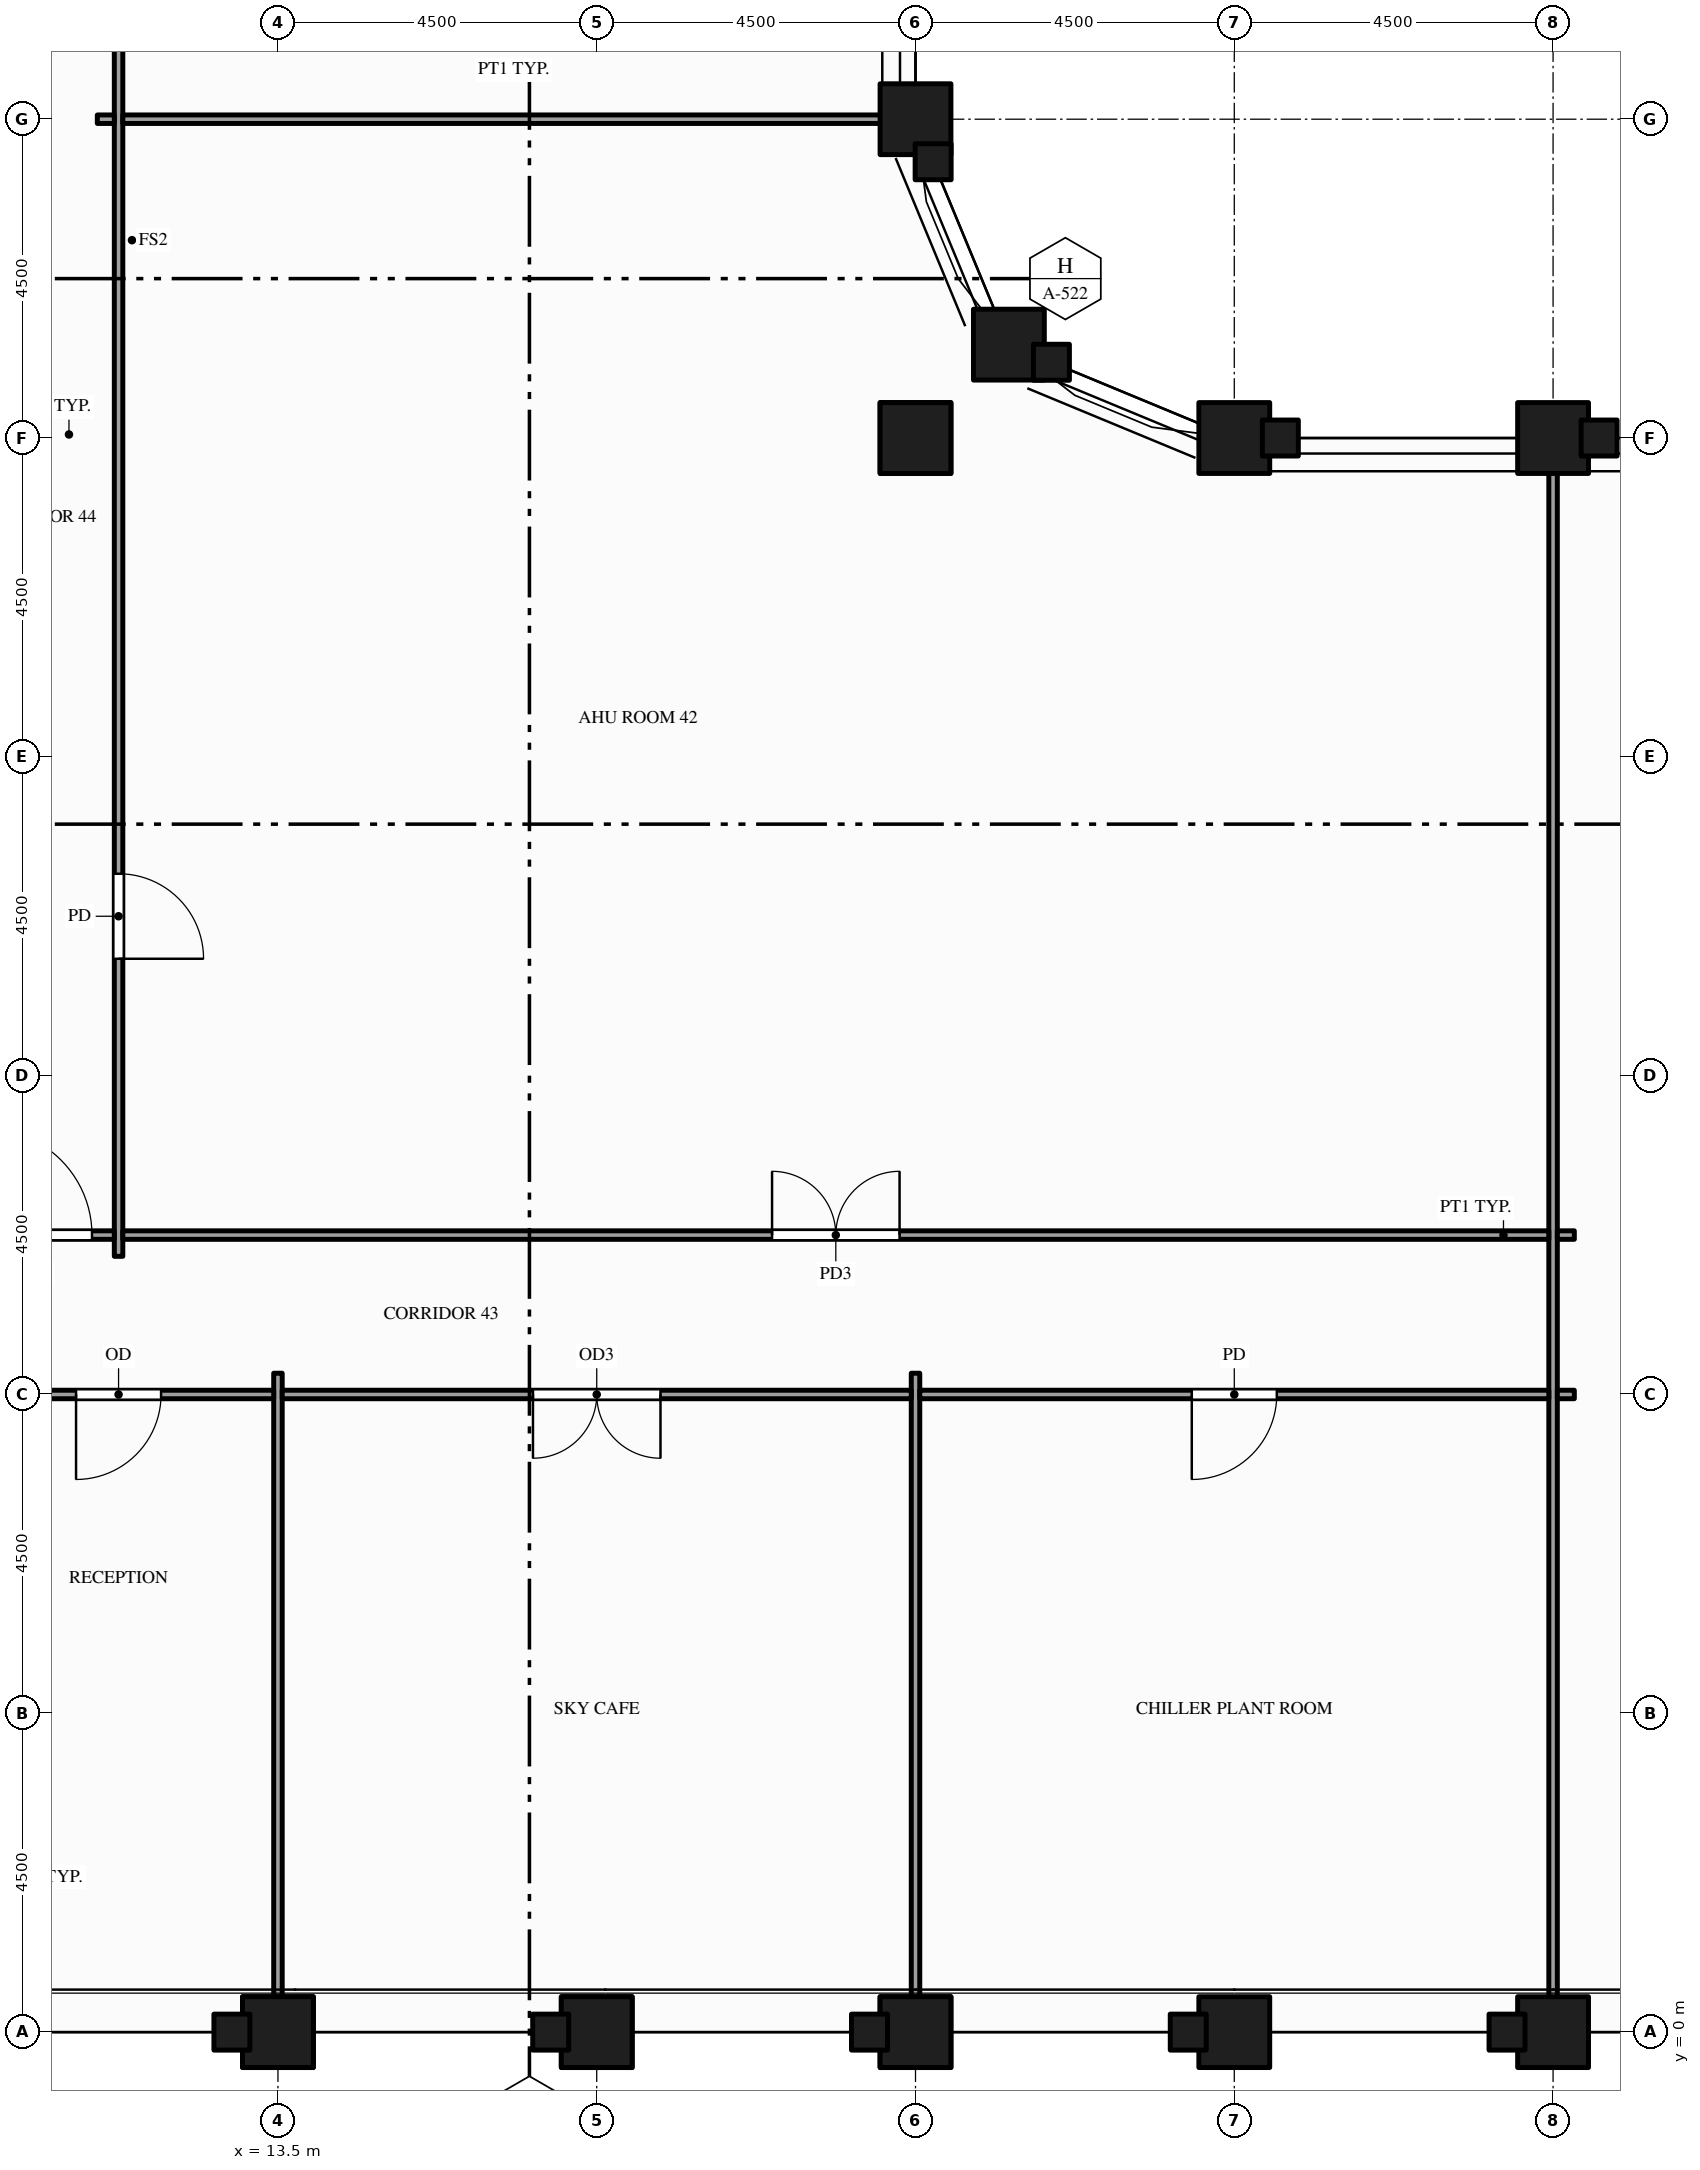
"""IFC4 building model, lengths in metres.
Left out: names, types, materials, properties, quantities, classifications, styles, units other than length and angle.
Written with IfcOpenShell. Run it as: python <this file> out.ifc"""

import sys

from ifc_helpers import new_model, si_unit, direction, frame, frame_2d, origin, origin_2d, place, context, subcontext, project, spatial, rectangle, hollow_rectangle, extrude, element, fill, save


model = new_model("IFC4")
c1 = context("Model", 3, precision=1e-05, world=origin(), true_north=direction((0.0, 1.0)))
c2 = subcontext(c1, "Body", "Model", "MODEL_VIEW")
j1 = project(units=[si_unit("LENGTHUNIT", "METRE"), si_unit("PLANEANGLEUNIT", "RADIAN")], contexts=[c1])
p1 = place(None, origin())
s1 = spatial("IfcSite", under=j1, at=p1, CompositionType="ELEMENT")
p2 = place(p1, origin())
s2 = spatial("IfcBuilding", under=s1, at=p2, CompositionType="ELEMENT")
p3 = place(p2, frame((0.0, 0.0, 131.0)))
s3 = spatial("IfcBuildingStorey", under=s2, at=p3, CompositionType="ELEMENT", Elevation=131.0)
p4 = place(p3, frame((13.5, 0.0, -0.25), z_axis=(0.0, 0.0, 1.0), x_axis=(1.0, 0.0, 0.0)))
e1 = element("IfcColumn", 1, at=p4, inside=s3, PredefinedType="COLUMN", context=c2, shape_type="SweptSolid", body=[
    extrude(hollow_rectangle(XDim=1.0, YDim=1.0, WallThickness=0.05, at=origin_2d()), origin(), (0.0, 0.0, 1.0), 6.6),
])
p5 = place(p3, frame((13.5, 0.0, 6.35), z_axis=(0.0, 0.0, 1.0), x_axis=(1.0, 0.0, 0.0)))
e2 = element("IfcColumn", 2, at=p5, inside=s3, PredefinedType="COLUMN", context=c2, shape_type="SweptSolid", body=[
    extrude(rectangle(XDim=1.0, YDim=1.0, at=origin_2d()), origin(), (0.0, 0.0, 1.0), 1.5),
])
p6 = place(p3, frame((18.0, 0.0, -0.25), z_axis=(0.0, 0.0, 1.0), x_axis=(1.0, 0.0, 0.0)))
e3 = element("IfcColumn", 3, at=p6, inside=s3, PredefinedType="COLUMN", context=c2, shape_type="SweptSolid", body=[
    extrude(hollow_rectangle(XDim=1.0, YDim=1.0, WallThickness=0.05, at=origin_2d()), origin(), (0.0, 0.0, 1.0), 6.6),
])
p7 = place(p3, frame((18.0, 0.0, 6.35), z_axis=(0.0, 0.0, 1.0), x_axis=(1.0, 0.0, 0.0)))
e4 = element("IfcColumn", 4, at=p7, inside=s3, PredefinedType="COLUMN", context=c2, shape_type="SweptSolid", body=[
    extrude(rectangle(XDim=1.0, YDim=1.0, at=origin_2d()), origin(), (0.0, 0.0, 1.0), 1.5),
])
p8 = place(p3, frame((22.5, 0.0, -0.25), z_axis=(0.0, 0.0, 1.0), x_axis=(1.0, 0.0, 0.0)))
e5 = element("IfcColumn", 5, at=p8, inside=s3, PredefinedType="COLUMN", context=c2, shape_type="SweptSolid", body=[
    extrude(hollow_rectangle(XDim=1.0, YDim=1.0, WallThickness=0.05, at=origin_2d()), origin(), (0.0, 0.0, 1.0), 6.6),
])
p9 = place(p3, frame((22.5, 0.0, 6.35), z_axis=(0.0, 0.0, 1.0), x_axis=(1.0, 0.0, 0.0)))
e6 = element("IfcColumn", 6, at=p9, inside=s3, PredefinedType="COLUMN", context=c2, shape_type="SweptSolid", body=[
    extrude(rectangle(XDim=1.0, YDim=1.0, at=origin_2d()), origin(), (0.0, 0.0, 1.0), 1.5),
])
p10 = place(p3, frame((22.5, 22.5, -0.25), z_axis=(0.0, 0.0, 1.0), x_axis=(1.0, 0.0, 0.0)))
e7 = element("IfcColumn", 7, at=p10, inside=s3, PredefinedType="COLUMN", context=c2, shape_type="SweptSolid", body=[
    extrude(hollow_rectangle(XDim=1.0, YDim=1.0, WallThickness=0.05, at=origin_2d()), origin(), (0.0, 0.0, 1.0), 6.6),
])
p11 = place(p3, frame((22.5, 22.5, 6.35), z_axis=(0.0, 0.0, 1.0), x_axis=(1.0, 0.0, 0.0)))
e8 = element("IfcColumn", 8, at=p11, inside=s3, PredefinedType="COLUMN", context=c2, shape_type="SweptSolid", body=[
    extrude(rectangle(XDim=1.0, YDim=1.0, at=origin_2d()), origin(), (0.0, 0.0, 1.0), 1.5),
])
for number, where, z_axis, x_axis in (
    (9, (22.5, 27.0, -0.25), (0.0, 0.0, 1.0), (1.0, 0.0, 0.0)),
    (10, (23.818, 23.818, -0.25), (0.0, 0.0, 1.0), (1.0, 0.0, 0.0)),
    (11, (27.0, 0.0, -0.25), (0.0, 0.0, 1.0), (1.0, 0.0, 0.0)),
    (12, (27.0, 22.5, -0.25), (0.0, 0.0, 1.0), (1.0, 0.0, 0.0)),
    (13, (31.5, 0.0, -0.25), (0.0, 0.0, 1.0), (1.0, 0.0, 0.0)),
    (14, (31.5, 22.5, -0.25), (0.0, 0.0, 1.0), (1.0, 0.0, 0.0)),
):
    element("IfcColumn", number, at=place(p3, frame(where, z_axis=z_axis, x_axis=x_axis)), inside=s3, PredefinedType="COLUMN", context=c2, shape_type="SweptSolid", body=[
        extrude(hollow_rectangle(XDim=1.0, YDim=1.0, WallThickness=0.05, at=origin_2d()), origin(), (0.0, 0.0, 1.0), 8.1),
    ])
p12 = place(p3, frame((11.25, 10.95, 0.0), z_axis=(0.0, 0.0, 1.0), x_axis=(0.0, 1.0, 0.0)))
e15 = element("IfcWall", 15, at=p12, inside=s3, PredefinedType="PARTITIONING", context=c2, shape_type="SweptSolid", body=[
    extrude(rectangle(XDim=20.85, YDim=0.12, at=frame_2d((10.425, 0.0))), origin(), (0.0, 0.0, 1.0), 6.6),
])
p13 = place(p12, frame((17.8, 0.0, 0.0)))
e16 = element("IfcOpeningElement", 16, at=p13, cuts=e15, PredefinedType="OPENING", context=c2, shape_type="SweptSolid", body=[
    extrude(rectangle(XDim=1.0, YDim=2.1, at=frame_2d((0.5, 1.05))), frame((0.0, 0.07, 0.0), z_axis=(0.0, -1.0, 0.0), x_axis=(1.0, 0.0, 0.0)), (0.0, 0.0, 1.0), 0.14),
])
p14 = place(p12, frame((4.2, 0.0, 0.0)))
e17 = element("IfcOpeningElement", 17, at=p14, cuts=e15, PredefinedType="OPENING", context=c2, shape_type="SweptSolid", body=[
    extrude(rectangle(XDim=1.2, YDim=2.1, at=frame_2d((0.6, 1.05))), frame((0.0, 0.07, 0.0), z_axis=(0.0, -1.0, 0.0), x_axis=(1.0, 0.0, 0.0)), (0.0, 0.0, 1.0), 0.14),
])
p15 = place(p3, frame((13.5, 0.15, 0.0), z_axis=(0.0, 0.0, 1.0), x_axis=(0.0, 1.0, 0.0)))
e18 = element("IfcWall", 18, at=p15, inside=s3, PredefinedType="PARTITIONING", context=c2, shape_type="SweptSolid", body=[
    extrude(rectangle(XDim=9.15, YDim=0.12, at=frame_2d((4.575, 0.0))), origin(), (0.0, 0.0, 1.0), 6.87),
])
p16 = place(p3, frame((22.5, 0.15, 0.0), z_axis=(0.0, 0.0, 1.0), x_axis=(0.0, 1.0, 0.0)))
e19 = element("IfcWall", 19, at=p16, inside=s3, PredefinedType="PARTITIONING", context=c2, shape_type="SweptSolid", body=[
    extrude(rectangle(XDim=9.15, YDim=0.12, at=frame_2d((4.575, 0.0))), origin(), (0.0, 0.0, 1.0), 6.45),
])
p17 = place(p3, frame((31.5, 0.15, 0.0), z_axis=(0.0, 0.0, 1.0), x_axis=(0.0, 1.0, 0.0)))
e20 = element("IfcWall", 20, at=p17, inside=s3, PredefinedType="PARTITIONING", context=c2, shape_type="SweptSolid", body=[
    extrude(rectangle(XDim=22.2, YDim=0.12, at=frame_2d((11.1, 0.0))), origin(), (0.0, 0.0, 1.0), 6.45),
])
p18 = place(p3, frame((9.06, 9.0, 0.0), z_axis=(0.0, 0.0, 1.0), x_axis=(1.0, 0.0, 0.0)))
e21 = element("IfcWall", 21, at=p18, inside=s3, PredefinedType="PARTITIONING", context=c2, shape_type="SweptSolid", body=[
    extrude(rectangle(XDim=4.38, YDim=0.12, at=frame_2d((2.19, 0.0))), origin(), (0.0, 0.0, 1.0), 6.87),
])
p19 = place(p18, frame((1.59, 0.0, 0.0)))
e22 = element("IfcOpeningElement", 22, at=p19, cuts=e21, PredefinedType="OPENING", context=c2, shape_type="SweptSolid", body=[
    extrude(rectangle(XDim=1.2, YDim=2.1, at=frame_2d((0.6, 1.05))), frame((0.0, 0.07, 0.0), z_axis=(0.0, -1.0, 0.0), x_axis=(1.0, 0.0, 0.0)), (0.0, 0.0, 1.0), 0.14),
])
p20 = place(p3, frame((13.56, 9.0, 0.0), z_axis=(0.0, 0.0, 1.0), x_axis=(1.0, 0.0, 0.0)))
e23 = element("IfcWall", 23, at=p20, inside=s3, PredefinedType="PARTITIONING", context=c2, shape_type="SweptSolid", body=[
    extrude(rectangle(XDim=8.88, YDim=0.12, at=frame_2d((4.44, 0.0))), origin(), (0.0, 0.0, 1.0), 6.87),
])
p21 = place(p20, frame((3.54, 0.0, 0.0)))
e24 = element("IfcOpeningElement", 24, at=p21, cuts=e23, PredefinedType="OPENING", context=c2, shape_type="SweptSolid", body=[
    extrude(rectangle(XDim=1.8, YDim=2.1, at=frame_2d((0.9, 1.05))), frame((0.0, 0.07, 0.0), z_axis=(0.0, -1.0, 0.0), x_axis=(1.0, 0.0, 0.0)), (0.0, 0.0, 1.0), 0.14),
])
p22 = place(p3, frame((22.56, 9.0, 0.0), z_axis=(0.0, 0.0, 1.0), x_axis=(1.0, 0.0, 0.0)))
e25 = element("IfcWall", 25, at=p22, inside=s3, PredefinedType="PARTITIONING", context=c2, shape_type="SweptSolid", body=[
    extrude(rectangle(XDim=8.88, YDim=0.12, at=frame_2d((4.44, 0.0))), origin(), (0.0, 0.0, 1.0), 6.87),
])
p23 = place(p22, frame((3.84, 0.0, 0.0)))
e26 = element("IfcOpeningElement", 26, at=p23, cuts=e25, PredefinedType="OPENING", context=c2, shape_type="SweptSolid", body=[
    extrude(rectangle(XDim=1.2, YDim=2.1, at=frame_2d((0.6, 1.05))), frame((0.0, 0.07, 0.0), z_axis=(0.0, -1.0, 0.0), x_axis=(1.0, 0.0, 0.0)), (0.0, 0.0, 1.0), 0.14),
])
p24 = place(p3, frame((31.56, 9.0, 0.0), z_axis=(0.0, 0.0, 1.0), x_axis=(1.0, 0.0, 0.0)))
e27 = element("IfcWall", 27, at=p24, inside=s3, PredefinedType="PARTITIONING", context=c2, shape_type="SweptSolid", body=[
    extrude(rectangle(XDim=0.24, YDim=0.12, at=frame_2d((0.12, 0.0))), origin(), (0.0, 0.0, 1.0), 7.149),
])
p25 = place(p3, frame((9.06, 11.25, 0.0), z_axis=(0.0, 0.0, 1.0), x_axis=(1.0, 0.0, 0.0)))
e28 = element("IfcWall", 28, at=p25, inside=s3, PredefinedType="PARTITIONING", context=c2, shape_type="SweptSolid", body=[
    extrude(rectangle(XDim=2.13, YDim=0.12, at=frame_2d((1.065, 0.0))), origin(), (0.0, 0.0, 1.0), 6.87),
])
p26 = place(p25, frame((0.315, 0.0, 0.0)))
e29 = element("IfcOpeningElement", 29, at=p26, cuts=e28, PredefinedType="OPENING", context=c2, shape_type="SweptSolid", body=[
    extrude(rectangle(XDim=1.5, YDim=2.1, at=frame_2d((0.75, 1.05))), frame((0.0, 0.07, 0.0), z_axis=(0.0, -1.0, 0.0), x_axis=(1.0, 0.0, 0.0)), (0.0, 0.0, 1.0), 0.14),
])
p27 = place(p3, frame((11.31, 11.25, 0.0), z_axis=(0.0, 0.0, 1.0), x_axis=(1.0, 0.0, 0.0)))
e30 = element("IfcWall", 30, at=p27, inside=s3, PredefinedType="PARTITIONING", context=c2, shape_type="SweptSolid", body=[
    extrude(rectangle(XDim=20.13, YDim=0.12, at=frame_2d((10.065, 0.0))), origin(), (0.0, 0.0, 1.0), 6.87),
])
p28 = place(p27, frame((9.165, 0.0, 0.0)))
e31 = element("IfcOpeningElement", 31, at=p28, cuts=e30, PredefinedType="OPENING", context=c2, shape_type="SweptSolid", body=[
    extrude(rectangle(XDim=1.8, YDim=2.1, at=frame_2d((0.9, 1.05))), frame((0.0, 0.07, 0.0), z_axis=(0.0, -1.0, 0.0), x_axis=(1.0, 0.0, 0.0)), (0.0, 0.0, 1.0), 0.14),
])
p29 = place(p3, frame((31.56, 11.25, 0.0), z_axis=(0.0, 0.0, 1.0), x_axis=(1.0, 0.0, 0.0)))
e32 = element("IfcWall", 32, at=p29, inside=s3, PredefinedType="PARTITIONING", context=c2, shape_type="SweptSolid", body=[
    extrude(rectangle(XDim=0.24, YDim=0.12, at=frame_2d((0.12, 0.0))), origin(), (0.0, 0.0, 1.0), 7.149),
])
p30 = place(p3, frame((10.95, 27.0, 0.0), z_axis=(0.0, 0.0, 1.0), x_axis=(1.0, 0.0, 0.0)))
e33 = element("IfcWall", 33, at=p30, inside=s3, PredefinedType="PARTITIONING", context=c2, shape_type="SweptSolid", body=[
    extrude(rectangle(XDim=0.24, YDim=0.12, at=frame_2d((0.12, 0.0))), origin(), (0.0, 0.0, 1.0), 6.87),
])
p31 = place(p3, frame((11.31, 27.0, 0.0), z_axis=(0.0, 0.0, 1.0), x_axis=(1.0, 0.0, 0.0)))
e34 = element("IfcWall", 34, at=p31, inside=s3, PredefinedType="PARTITIONING", context=c2, shape_type="SweptSolid", body=[
    extrude(rectangle(XDim=11.04, YDim=0.12, at=frame_2d((5.52, 0.0))), origin(), (0.0, 0.0, 1.0), 6.87),
])
p32 = place(p19, origin())
e35 = element("IfcDoor", 35, at=p32, inside=s3, OperationType="SINGLE_SWING_LEFT", PredefinedType="DOOR", context=c2, shape_type="SweptSolid", body=[
    extrude(rectangle(XDim=1.2, YDim=2.1, at=frame_2d((0.6, 1.05))), frame((0.0, 0.025, 0.0), z_axis=(0.0, -1.0, 0.0), x_axis=(1.0, 0.0, 0.0)), (0.0, 0.0, 1.0), 0.05),
])
fill(e22, e35)
p33 = place(p21, origin())
e36 = element("IfcDoor", 36, at=p33, inside=s3, OperationType="DOUBLE_DOOR_SINGLE_SWING", PredefinedType="DOOR", context=c2, shape_type="SweptSolid", body=[
    extrude(rectangle(XDim=1.8, YDim=2.1, at=frame_2d((0.9, 1.05))), frame((0.0, 0.025, 0.0), z_axis=(0.0, -1.0, 0.0), x_axis=(1.0, 0.0, 0.0)), (0.0, 0.0, 1.0), 0.05),
])
fill(e24, e36)
p34 = place(p23, origin())
e37 = element("IfcDoor", 37, at=p34, inside=s3, OperationType="SINGLE_SWING_LEFT", PredefinedType="DOOR", context=c2, shape_type="SweptSolid", body=[
    extrude(rectangle(XDim=1.2, YDim=2.1, at=frame_2d((0.6, 1.05))), frame((0.0, 0.025, 0.0), z_axis=(0.0, -1.0, 0.0), x_axis=(1.0, 0.0, 0.0)), (0.0, 0.0, 1.0), 0.05),
])
fill(e26, e37)
p35 = place(p28, origin())
e38 = element("IfcDoor", 38, at=p35, inside=s3, OperationType="DOUBLE_DOOR_SINGLE_SWING", PredefinedType="DOOR", context=c2, shape_type="SweptSolid", body=[
    extrude(rectangle(XDim=1.8, YDim=2.1, at=frame_2d((0.9, 1.05))), frame((0.0, 0.025, 0.0), z_axis=(0.0, -1.0, 0.0), x_axis=(1.0, 0.0, 0.0)), (0.0, 0.0, 1.0), 0.05),
])
fill(e31, e38)
p36 = place(p26, origin())
e39 = element("IfcDoor", 39, at=p36, inside=s3, OperationType="SINGLE_SWING_LEFT", PredefinedType="DOOR", context=c2, shape_type="SweptSolid", body=[
    extrude(rectangle(XDim=1.5, YDim=2.1, at=frame_2d((0.75, 1.05))), frame((0.0, 0.025, 0.0), z_axis=(0.0, -1.0, 0.0), x_axis=(1.0, 0.0, 0.0)), (0.0, 0.0, 1.0), 0.05),
])
fill(e29, e39)
p37 = place(p14, origin())
e40 = element("IfcDoor", 40, at=p37, inside=s3, OperationType="SINGLE_SWING_LEFT", PredefinedType="DOOR", context=c2, shape_type="SweptSolid", body=[
    extrude(rectangle(XDim=1.2, YDim=2.1, at=frame_2d((0.6, 1.05))), frame((0.0, 0.025, 0.0), z_axis=(0.0, -1.0, 0.0), x_axis=(1.0, 0.0, 0.0)), (0.0, 0.0, 1.0), 0.05),
])
fill(e17, e40)
save(model, sys.argv[1])
